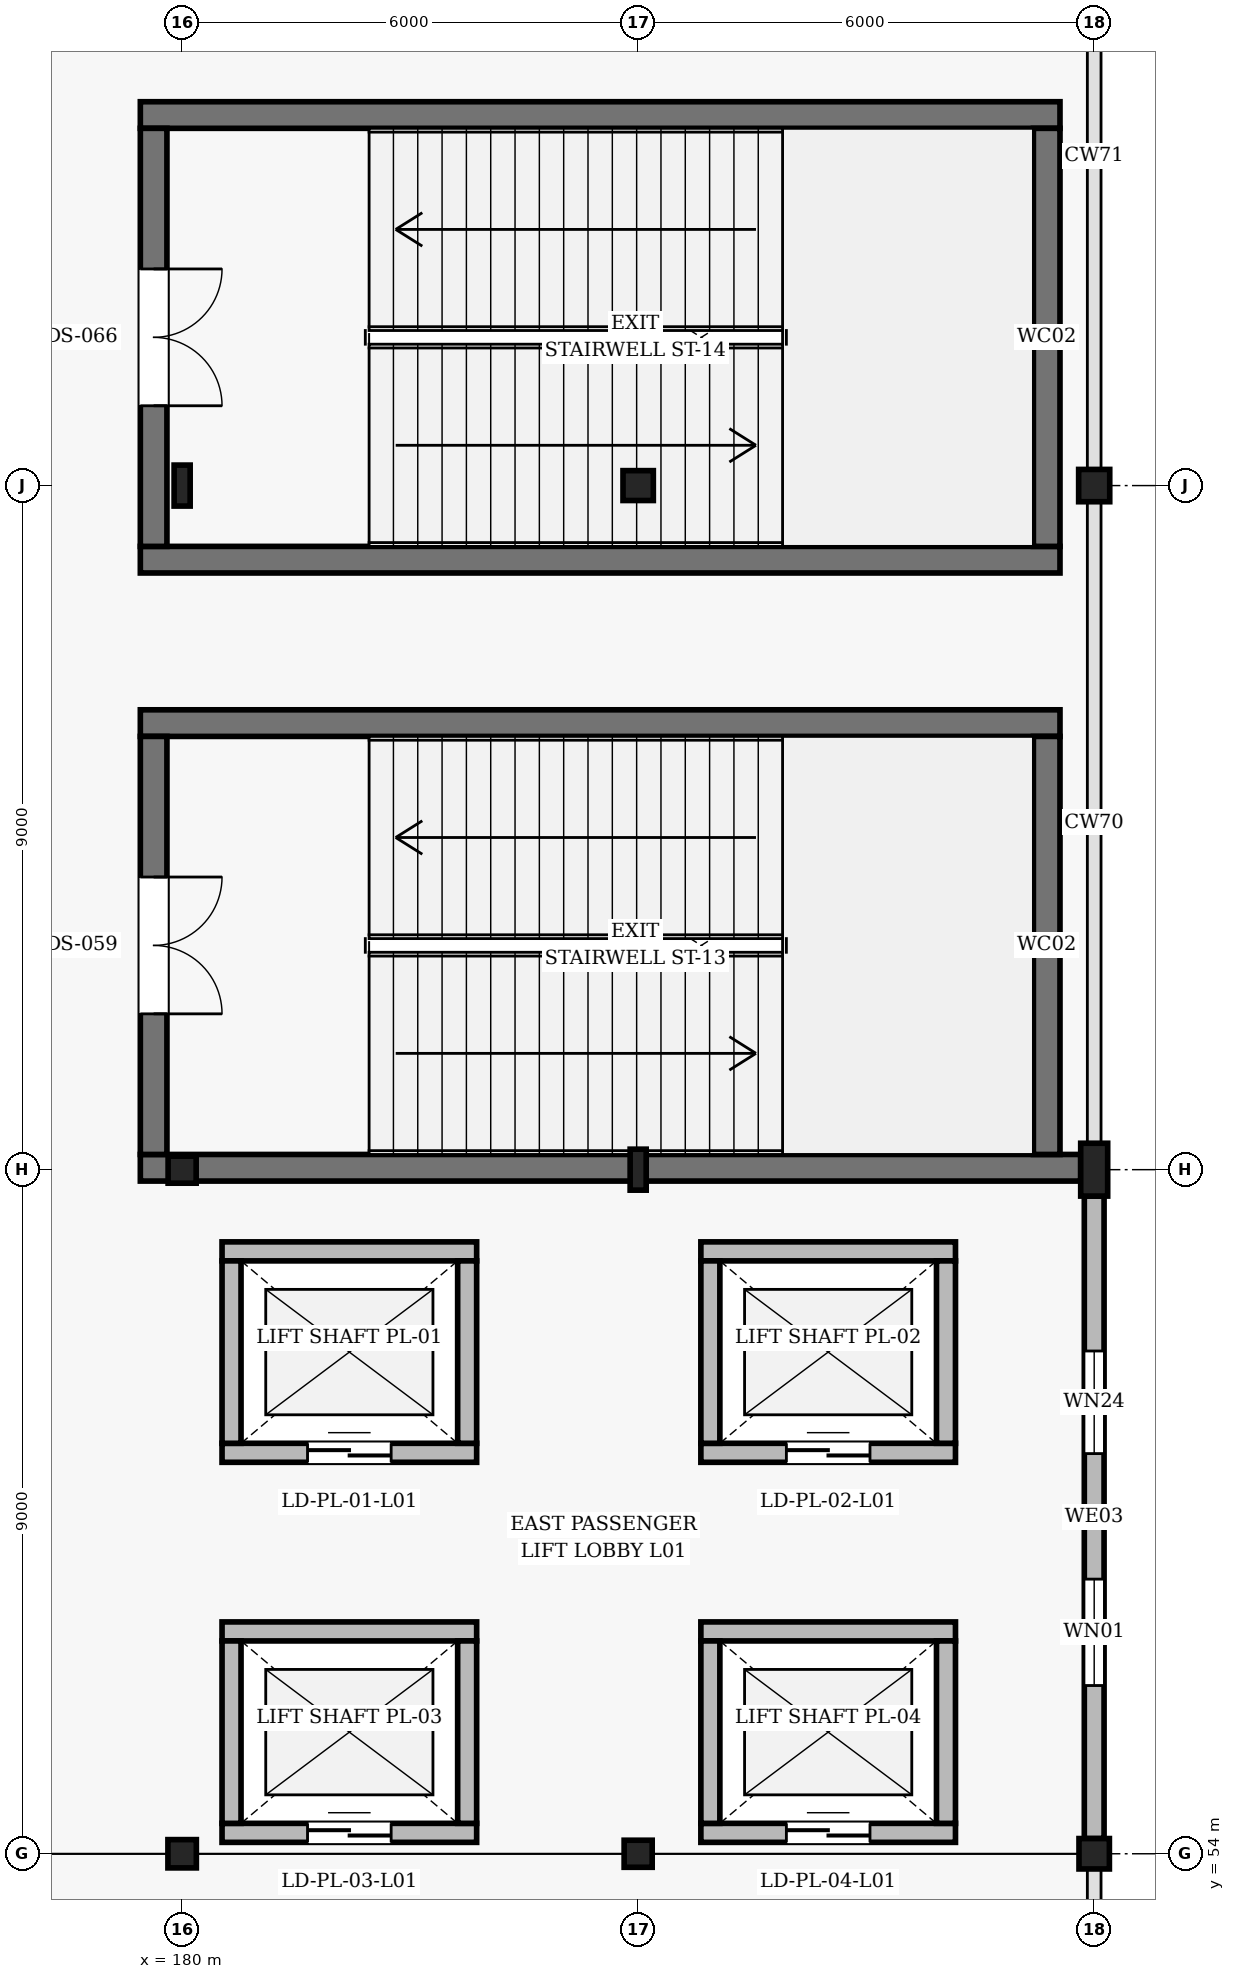
"""IFC4 building model, lengths in metres.
Left out: names, types, materials, properties, quantities, classifications, styles, units other than length and angle.
Written with IfcOpenShell. Run it as: python <this file> out.ifc"""

import sys

from ifc_helpers import new_model, si_unit, direction, frame, frame_2d, origin, origin_2d, place, context, subcontext, project, spatial, rectangle, hollow_rectangle, i_section, extrude, element, fill, save


model = new_model("IFC4")
c1 = context("Model", 3, precision=1e-05, world=origin(), true_north=direction((0.0, 1.0)))
c2 = subcontext(c1, "Body", "Model", "MODEL_VIEW")
j1 = project(units=[si_unit("LENGTHUNIT", "METRE"), si_unit("PLANEANGLEUNIT", "RADIAN")], contexts=[c1])
p1 = place(None, origin())
s1 = spatial("IfcSite", under=j1, at=p1, CompositionType="ELEMENT")
p2 = place(p1, origin())
s2 = spatial("IfcBuilding", under=s1, at=p2, CompositionType="ELEMENT")
p3 = place(p2, frame((0.0, 0.0, 5.4)))
s3 = spatial("IfcBuildingStorey", under=s2, at=p3, CompositionType="ELEMENT", Elevation=5.4)
p4 = place(p3, frame((180.0, 54.0, 0.0), z_axis=(0.0, 0.0, 1.0), x_axis=(1.0, 0.0, 0.0)))
e1 = element("IfcColumn", 1, at=p4, inside=s3, PredefinedType="COLUMN", context=c2, shape_type="SweptSolid", body=[
    extrude(i_section(OverallWidth=0.374, OverallDepth=0.372, WebThickness=0.016, FlangeThickness=0.026, FilletRadius=0.016, at=origin_2d()), origin(), (0.0, 0.0, 1.0), 5.4),
])
p5 = place(p3, frame((180.0, 63.0, 0.0), z_axis=(0.0, 0.0, 1.0), x_axis=(1.0, 0.0, 0.0)))
e2 = element("IfcColumn", 2, at=p5, inside=s3, PredefinedType="COLUMN", context=c2, shape_type="SweptSolid", body=[
    extrude(i_section(OverallWidth=0.369, OverallDepth=0.356, WebThickness=0.011, FlangeThickness=0.018, FilletRadius=0.015, at=origin_2d()), origin(), (0.0, 0.0, 1.0), 5.4),
])
p6 = place(p3, frame((180.0, 72.0, 0.0), z_axis=(0.0, 0.0, 1.0), x_axis=(1.0, 0.0, 0.0)))
e3 = element("IfcColumn", 3, at=p6, inside=s3, PredefinedType="COLUMN", context=c2, shape_type="SweptSolid", body=[
    extrude(i_section(OverallWidth=0.211, OverallDepth=0.539, WebThickness=0.012, FlangeThickness=0.019, FilletRadius=0.014, at=origin_2d()), origin(), (0.0, 0.0, 1.0), 5.4),
])
p7 = place(p3, frame((186.0, 54.0, 0.0), z_axis=(0.0, 0.0, 1.0), x_axis=(1.0, 0.0, 0.0)))
e4 = element("IfcColumn", 4, at=p7, inside=s3, PredefinedType="COLUMN", context=c2, shape_type="SweptSolid", body=[
    extrude(i_section(OverallWidth=0.369, OverallDepth=0.356, WebThickness=0.011, FlangeThickness=0.018, FilletRadius=0.015, at=origin_2d()), origin(), (0.0, 0.0, 1.0), 5.4),
])
p8 = place(p3, frame((186.0, 63.0, 0.0), z_axis=(0.0, 0.0, 1.0), x_axis=(1.0, 0.0, 0.0)))
e5 = element("IfcColumn", 5, at=p8, inside=s3, PredefinedType="COLUMN", context=c2, shape_type="SweptSolid", body=[
    extrude(i_section(OverallWidth=0.211, OverallDepth=0.539, WebThickness=0.012, FlangeThickness=0.019, FilletRadius=0.014, at=origin_2d()), origin(), (0.0, 0.0, 1.0), 5.4),
])
p9 = place(p3, frame((186.0, 72.0, 0.0), z_axis=(0.0, 0.0, 1.0), x_axis=(1.0, 0.0, 0.0)))
e6 = element("IfcColumn", 6, at=p9, inside=s3, PredefinedType="COLUMN", context=c2, shape_type="SweptSolid", body=[
    extrude(i_section(OverallWidth=0.399, OverallDepth=0.393, WebThickness=0.023, FlangeThickness=0.037, FilletRadius=0.018, at=origin_2d()), origin(), (0.0, 0.0, 1.0), 5.4),
])
p10 = place(p3, frame((192.0, 54.0, 0.0), z_axis=(0.0, 0.0, 1.0), x_axis=(1.0, 0.0, 0.0)))
e7 = element("IfcColumn", 7, at=p10, inside=s3, PredefinedType="COLUMN", context=c2, shape_type="SweptSolid", body=[
    extrude(hollow_rectangle(XDim=0.4, YDim=0.4, WallThickness=0.016, InnerFilletRadius=0.016, OuterFilletRadius=0.032, at=origin_2d()), origin(), (0.0, 0.0, 1.0), 5.4),
])
p11 = place(p3, frame((192.0, 63.0, 0.0), z_axis=(0.0, 0.0, 1.0), x_axis=(1.0, 0.0, 0.0)))
e8 = element("IfcColumn", 8, at=p11, inside=s3, PredefinedType="COLUMN", context=c2, shape_type="SweptSolid", body=[
    extrude(i_section(OverallWidth=0.355, OverallDepth=0.695, WebThickness=0.015, FlangeThickness=0.025, FilletRadius=0.018, at=origin_2d()), origin(), (0.0, 0.0, 1.0), 5.4),
])
p12 = place(p3, frame((192.0, 72.0, 0.0), z_axis=(0.0, 0.0, 1.0), x_axis=(1.0, 0.0, 0.0)))
e9 = element("IfcColumn", 9, at=p12, inside=s3, PredefinedType="COLUMN", context=c2, shape_type="SweptSolid", body=[
    extrude(i_section(OverallWidth=0.409, OverallDepth=0.425, WebThickness=0.031, FlangeThickness=0.049, FilletRadius=0.02, at=origin_2d()), origin(), (0.0, 0.0, 1.0), 5.4),
])
p13 = place(p3, frame((192.0, 62.653, 0.0), z_axis=(0.0, 0.0, 1.0), x_axis=(0.0, -1.0, 0.0)))
e10 = element("IfcWall", 10, at=p13, inside=s3, PredefinedType="SOLIDWALL", context=c2, shape_type="SweptSolid", body=[
    extrude(rectangle(XDim=8.453, YDim=0.26, at=frame_2d((4.226, 0.0))), origin(), (0.0, 0.0, 1.0), 4.865),
])
p14 = place(p13, frame((2.038, 0.0, 0.95)))
e11 = element("IfcOpeningElement", 11, at=p14, cuts=e10, PredefinedType="OPENING", context=c2, shape_type="SweptSolid", body=[
    extrude(rectangle(XDim=1.35, YDim=1.6, at=frame_2d((0.675, 0.8))), frame((0.0, 0.14, 0.0), z_axis=(0.0, -1.0, 0.0), x_axis=(1.0, 0.0, 0.0)), (0.0, 0.0, 1.0), 0.28),
])
p15 = place(p13, frame((5.039, 0.0, 0.95)))
e12 = element("IfcOpeningElement", 12, at=p15, cuts=e10, PredefinedType="OPENING", context=c2, shape_type="SweptSolid", body=[
    extrude(rectangle(XDim=1.4, YDim=1.7, at=frame_2d((0.7, 0.85))), frame((0.0, 0.14, 0.0), z_axis=(0.0, -1.0, 0.0), x_axis=(1.0, 0.0, 0.0)), (0.0, 0.0, 1.0), 0.28),
])
p16 = place(p3, frame((179.45, 63.025, 0.0), z_axis=(0.0, 0.0, 1.0), x_axis=(1.0, 0.0, 0.0)))
e13 = element("IfcWall", 13, at=p16, inside=s3, PredefinedType="SHEAR", context=c2, shape_type="SweptSolid", body=[
    extrude(rectangle(XDim=12.373, YDim=0.35, at=frame_2d((6.186, 0.0))), origin(), (0.0, 0.0, 1.0), 5.18),
])
p17 = place(p3, frame((191.55, 68.875, 0.0), z_axis=(0.0, 0.0, 1.0), x_axis=(-1.0, 0.0, 0.0)))
e14 = element("IfcWall", 14, at=p17, inside=s3, PredefinedType="SHEAR", context=c2, shape_type="SweptSolid", body=[
    extrude(rectangle(XDim=12.1, YDim=0.35, at=frame_2d((6.05, 0.0))), origin(), (0.0, 0.0, 1.0), 5.18),
])
p18 = place(p3, frame((179.625, 68.7, 0.0), z_axis=(0.0, 0.0, 1.0), x_axis=(0.0, -1.0, 0.0)))
e15 = element("IfcWall", 15, at=p18, inside=s3, PredefinedType="SHEAR", context=c2, shape_type="SweptSolid", body=[
    extrude(rectangle(XDim=5.5, YDim=0.35, at=frame_2d((2.75, 0.0))), origin(), (0.0, 0.0, 1.0), 5.18),
])
p19 = place(p18, frame((1.85, 0.0, 0.0)))
e16 = element("IfcOpeningElement", 16, at=p19, cuts=e15, PredefinedType="OPENING", context=c2, shape_type="SweptSolid", body=[
    extrude(rectangle(XDim=1.8, YDim=2.2, at=frame_2d((0.9, 1.1))), frame((0.0, 0.185, 0.0), z_axis=(0.0, -1.0, 0.0), x_axis=(1.0, 0.0, 0.0)), (0.0, 0.0, 1.0), 0.37),
])
p20 = place(p3, frame((191.375, 63.2, 0.0), z_axis=(0.0, 0.0, 1.0), x_axis=(0.0, 1.0, 0.0)))
e17 = element("IfcWall", 17, at=p20, inside=s3, PredefinedType="SHEAR", context=c2, shape_type="SweptSolid", body=[
    extrude(rectangle(XDim=5.5, YDim=0.35, at=frame_2d((2.75, 0.0))), origin(), (0.0, 0.0, 1.0), 5.18),
])
for number, where, z_axis, x_axis in (
    (18, (179.45, 71.025, 0.0), (0.0, 0.0, 1.0), (1.0, 0.0, 0.0)),
    (19, (191.55, 76.875, 0.0), (0.0, 0.0, 1.0), (-1.0, 0.0, 0.0)),
):
    element("IfcWall", number, at=place(p3, frame(where, z_axis=z_axis, x_axis=x_axis)), inside=s3, PredefinedType="SHEAR", context=c2, shape_type="SweptSolid", body=[
        extrude(rectangle(XDim=12.1, YDim=0.35, at=frame_2d((6.05, 0.0))), origin(), (0.0, 0.0, 1.0), 5.18),
    ])
p21 = place(p3, frame((179.625, 76.7, 0.0), z_axis=(0.0, 0.0, 1.0), x_axis=(0.0, -1.0, 0.0)))
e20 = element("IfcWall", 20, at=p21, inside=s3, PredefinedType="SHEAR", context=c2, shape_type="SweptSolid", body=[
    extrude(rectangle(XDim=5.5, YDim=0.35, at=frame_2d((2.75, 0.0))), origin(), (0.0, 0.0, 1.0), 5.18),
])
p22 = place(p21, frame((1.85, 0.0, 0.0)))
e21 = element("IfcOpeningElement", 21, at=p22, cuts=e20, PredefinedType="OPENING", context=c2, shape_type="SweptSolid", body=[
    extrude(rectangle(XDim=1.8, YDim=2.2, at=frame_2d((0.9, 1.1))), frame((0.0, 0.185, 0.0), z_axis=(0.0, -1.0, 0.0), x_axis=(1.0, 0.0, 0.0)), (0.0, 0.0, 1.0), 0.37),
])
p23 = place(p3, frame((191.375, 71.2, 0.0), z_axis=(0.0, 0.0, 1.0), x_axis=(0.0, 1.0, 0.0)))
e22 = element("IfcWall", 22, at=p23, inside=s3, PredefinedType="SHEAR", context=c2, shape_type="SweptSolid", body=[
    extrude(rectangle(XDim=5.5, YDim=0.35, at=frame_2d((2.75, 0.0))), origin(), (0.0, 0.0, 1.0), 5.18),
])
p24 = place(p3, frame((180.525, 59.275, 0.0), z_axis=(0.0, 0.0, 1.0), x_axis=(1.0, 0.0, 0.0)))
e23 = element("IfcWall", 23, at=p24, inside=s3, PredefinedType="SOLIDWALL", context=c2, shape_type="SweptSolid", body=[
    extrude(rectangle(XDim=3.35, YDim=0.25, at=frame_2d((1.675, 0.0))), origin(), (0.0, 0.0, 1.0), 5.16),
])
p25 = place(p24, frame((1.125, 0.0, 0.0)))
e24 = element("IfcOpeningElement", 24, at=p25, cuts=e23, PredefinedType="OPENING", context=c2, shape_type="SweptSolid", body=[
    extrude(rectangle(XDim=1.1, YDim=2.2, at=frame_2d((0.55, 1.1))), frame((0.0, 0.135, 0.0), z_axis=(0.0, -1.0, 0.0), x_axis=(1.0, 0.0, 0.0)), (0.0, 0.0, 1.0), 0.27),
])
p26 = place(p3, frame((183.875, 61.925, 0.0), z_axis=(0.0, 0.0, 1.0), x_axis=(-1.0, 0.0, 0.0)))
e25 = element("IfcWall", 25, at=p26, inside=s3, PredefinedType="SOLIDWALL", context=c2, shape_type="SweptSolid", body=[
    extrude(rectangle(XDim=3.35, YDim=0.25, at=frame_2d((1.675, 0.0))), origin(), (0.0, 0.0, 1.0), 5.16),
])
for number, where, z_axis, x_axis in (
    (26, (180.65, 61.8, 0.0), (0.0, 0.0, 1.0), (0.0, -1.0, 0.0)),
    (27, (183.75, 59.4, 0.0), (0.0, 0.0, 1.0), (0.0, 1.0, 0.0)),
):
    element("IfcWall", number, at=place(p3, frame(where, z_axis=z_axis, x_axis=x_axis)), inside=s3, PredefinedType="SOLIDWALL", context=c2, shape_type="SweptSolid", body=[
        extrude(rectangle(XDim=2.4, YDim=0.25, at=frame_2d((1.2, 0.0))), origin(), (0.0, 0.0, 1.0), 5.16),
    ])
p27 = place(p3, frame((186.825, 59.275, 0.0), z_axis=(0.0, 0.0, 1.0), x_axis=(1.0, 0.0, 0.0)))
e28 = element("IfcWall", 28, at=p27, inside=s3, PredefinedType="SOLIDWALL", context=c2, shape_type="SweptSolid", body=[
    extrude(rectangle(XDim=3.35, YDim=0.25, at=frame_2d((1.675, 0.0))), origin(), (0.0, 0.0, 1.0), 5.16),
])
p28 = place(p27, frame((1.125, 0.0, 0.0)))
e29 = element("IfcOpeningElement", 29, at=p28, cuts=e28, PredefinedType="OPENING", context=c2, shape_type="SweptSolid", body=[
    extrude(rectangle(XDim=1.1, YDim=2.2, at=frame_2d((0.55, 1.1))), frame((0.0, 0.135, 0.0), z_axis=(0.0, -1.0, 0.0), x_axis=(1.0, 0.0, 0.0)), (0.0, 0.0, 1.0), 0.27),
])
p29 = place(p3, frame((190.175, 61.925, 0.0), z_axis=(0.0, 0.0, 1.0), x_axis=(-1.0, 0.0, 0.0)))
e30 = element("IfcWall", 30, at=p29, inside=s3, PredefinedType="SOLIDWALL", context=c2, shape_type="SweptSolid", body=[
    extrude(rectangle(XDim=3.35, YDim=0.25, at=frame_2d((1.675, 0.0))), origin(), (0.0, 0.0, 1.0), 5.16),
])
for number, where, z_axis, x_axis in (
    (31, (186.95, 61.8, 0.0), (0.0, 0.0, 1.0), (0.0, -1.0, 0.0)),
    (32, (190.05, 59.4, 0.0), (0.0, 0.0, 1.0), (0.0, 1.0, 0.0)),
):
    element("IfcWall", number, at=place(p3, frame(where, z_axis=z_axis, x_axis=x_axis)), inside=s3, PredefinedType="SOLIDWALL", context=c2, shape_type="SweptSolid", body=[
        extrude(rectangle(XDim=2.4, YDim=0.25, at=frame_2d((1.2, 0.0))), origin(), (0.0, 0.0, 1.0), 5.16),
    ])
p30 = place(p3, frame((180.525, 54.275, 0.0), z_axis=(0.0, 0.0, 1.0), x_axis=(1.0, 0.0, 0.0)))
e33 = element("IfcWall", 33, at=p30, inside=s3, PredefinedType="SOLIDWALL", context=c2, shape_type="SweptSolid", body=[
    extrude(rectangle(XDim=3.35, YDim=0.25, at=frame_2d((1.675, 0.0))), origin(), (0.0, 0.0, 1.0), 4.43),
])
p31 = place(p30, frame((1.125, 0.0, 0.0)))
e34 = element("IfcOpeningElement", 34, at=p31, cuts=e33, PredefinedType="OPENING", context=c2, shape_type="SweptSolid", body=[
    extrude(rectangle(XDim=1.1, YDim=2.2, at=frame_2d((0.55, 1.1))), frame((0.0, 0.135, 0.0), z_axis=(0.0, -1.0, 0.0), x_axis=(1.0, 0.0, 0.0)), (0.0, 0.0, 1.0), 0.27),
])
p32 = place(p3, frame((183.875, 56.925, 0.0), z_axis=(0.0, 0.0, 1.0), x_axis=(-1.0, 0.0, 0.0)))
e35 = element("IfcWall", 35, at=p32, inside=s3, PredefinedType="SOLIDWALL", context=c2, shape_type="SweptSolid", body=[
    extrude(rectangle(XDim=3.35, YDim=0.25, at=frame_2d((1.675, 0.0))), origin(), (0.0, 0.0, 1.0), 4.557),
])
for number, where, z_axis, x_axis in (
    (36, (180.65, 56.8, 0.0), (0.0, 0.0, 1.0), (0.0, -1.0, 0.0)),
    (37, (183.75, 54.4, 0.0), (0.0, 0.0, 1.0), (0.0, 1.0, 0.0)),
):
    element("IfcWall", number, at=place(p3, frame(where, z_axis=z_axis, x_axis=x_axis)), inside=s3, PredefinedType="SOLIDWALL", context=c2, shape_type="SweptSolid", body=[
        extrude(rectangle(XDim=2.4, YDim=0.25, at=frame_2d((1.2, 0.0))), origin(), (0.0, 0.0, 1.0), 4.43),
    ])
p33 = place(p3, frame((186.825, 54.275, 0.0), z_axis=(0.0, 0.0, 1.0), x_axis=(1.0, 0.0, 0.0)))
e38 = element("IfcWall", 38, at=p33, inside=s3, PredefinedType="SOLIDWALL", context=c2, shape_type="SweptSolid", body=[
    extrude(rectangle(XDim=3.35, YDim=0.25, at=frame_2d((1.675, 0.0))), origin(), (0.0, 0.0, 1.0), 4.441),
])
p34 = place(p33, frame((1.125, 0.0, 0.0)))
e39 = element("IfcOpeningElement", 39, at=p34, cuts=e38, PredefinedType="OPENING", context=c2, shape_type="SweptSolid", body=[
    extrude(rectangle(XDim=1.1, YDim=2.2, at=frame_2d((0.55, 1.1))), frame((0.0, 0.135, 0.0), z_axis=(0.0, -1.0, 0.0), x_axis=(1.0, 0.0, 0.0)), (0.0, 0.0, 1.0), 0.27),
])
p35 = place(p3, frame((190.175, 56.925, 0.0), z_axis=(0.0, 0.0, 1.0), x_axis=(-1.0, 0.0, 0.0)))
e40 = element("IfcWall", 40, at=p35, inside=s3, PredefinedType="SOLIDWALL", context=c2, shape_type="SweptSolid", body=[
    extrude(rectangle(XDim=3.35, YDim=0.25, at=frame_2d((1.675, 0.0))), origin(), (0.0, 0.0, 1.0), 4.708),
])
for number, where, z_axis, x_axis in (
    (41, (186.95, 56.8, 0.0), (0.0, 0.0, 1.0), (0.0, -1.0, 0.0)),
    (42, (190.05, 54.4, 0.0), (0.0, 0.0, 1.0), (0.0, 1.0, 0.0)),
):
    element("IfcWall", number, at=place(p3, frame(where, z_axis=z_axis, x_axis=x_axis)), inside=s3, PredefinedType="SOLIDWALL", context=c2, shape_type="SweptSolid", body=[
        extrude(rectangle(XDim=2.4, YDim=0.25, at=frame_2d((1.2, 0.0))), origin(), (0.0, 0.0, 1.0), 4.441),
    ])
p36 = place(p14, origin())
e43 = element("IfcWindow", 43, at=p36, inside=s3, PartitioningType="SINGLE_PANEL", PredefinedType="WINDOW", context=c2, shape_type="SweptSolid", body=[
    extrude(rectangle(XDim=1.35, YDim=1.6, at=frame_2d((0.675, 0.8))), frame((0.0, 0.03, 0.0), z_axis=(0.0, -1.0, 0.0), x_axis=(1.0, 0.0, 0.0)), (0.0, 0.0, 1.0), 0.06),
])
fill(e11, e43)
p37 = place(p15, origin())
e44 = element("IfcWindow", 44, at=p37, inside=s3, PartitioningType="SINGLE_PANEL", PredefinedType="WINDOW", context=c2, shape_type="SweptSolid", body=[
    extrude(rectangle(XDim=1.4, YDim=1.7, at=frame_2d((0.7, 0.85))), frame((0.0, 0.03, 0.0), z_axis=(0.0, -1.0, 0.0), x_axis=(1.0, 0.0, 0.0)), (0.0, 0.0, 1.0), 0.06),
])
fill(e12, e44)
p38 = place(p19, origin())
e45 = element("IfcDoor", 45, at=p38, inside=s3, OperationType="DOUBLE_DOOR_SINGLE_SWING", PredefinedType="DOOR", context=c2, shape_type="SweptSolid", body=[
    extrude(rectangle(XDim=1.8, YDim=2.2, at=frame_2d((0.9, 1.1))), frame((0.0, 0.025, 0.0), z_axis=(0.0, -1.0, 0.0), x_axis=(1.0, 0.0, 0.0)), (0.0, 0.0, 1.0), 0.05),
])
fill(e16, e45)
p39 = place(p22, origin())
e46 = element("IfcDoor", 46, at=p39, inside=s3, OperationType="DOUBLE_DOOR_SINGLE_SWING", PredefinedType="DOOR", context=c2, shape_type="SweptSolid", body=[
    extrude(rectangle(XDim=1.8, YDim=2.2, at=frame_2d((0.9, 1.1))), frame((0.0, 0.025, 0.0), z_axis=(0.0, -1.0, 0.0), x_axis=(1.0, 0.0, 0.0)), (0.0, 0.0, 1.0), 0.05),
])
fill(e21, e46)
p40 = place(p25, origin())
e47 = element("IfcDoor", 47, at=p40, inside=s3, OperationType="DOUBLE_DOOR_SLIDING", PredefinedType="DOOR", context=c2, shape_type="SweptSolid", body=[
    extrude(rectangle(XDim=1.1, YDim=2.2, at=frame_2d((0.55, 1.1))), frame((0.0, 0.025, 0.0), z_axis=(0.0, -1.0, 0.0), x_axis=(1.0, 0.0, 0.0)), (0.0, 0.0, 1.0), 0.05),
])
fill(e24, e47)
p41 = place(p28, origin())
e48 = element("IfcDoor", 48, at=p41, inside=s3, OperationType="DOUBLE_DOOR_SLIDING", PredefinedType="DOOR", context=c2, shape_type="SweptSolid", body=[
    extrude(rectangle(XDim=1.1, YDim=2.2, at=frame_2d((0.55, 1.1))), frame((0.0, 0.025, 0.0), z_axis=(0.0, -1.0, 0.0), x_axis=(1.0, 0.0, 0.0)), (0.0, 0.0, 1.0), 0.05),
])
fill(e29, e48)
p42 = place(p31, origin())
e49 = element("IfcDoor", 49, at=p42, inside=s3, OperationType="DOUBLE_DOOR_SLIDING", PredefinedType="DOOR", context=c2, shape_type="SweptSolid", body=[
    extrude(rectangle(XDim=1.1, YDim=2.2, at=frame_2d((0.55, 1.1))), frame((0.0, 0.025, 0.0), z_axis=(0.0, -1.0, 0.0), x_axis=(1.0, 0.0, 0.0)), (0.0, 0.0, 1.0), 0.05),
])
fill(e34, e49)
p43 = place(p34, origin())
e50 = element("IfcDoor", 50, at=p43, inside=s3, OperationType="DOUBLE_DOOR_SLIDING", PredefinedType="DOOR", context=c2, shape_type="SweptSolid", body=[
    extrude(rectangle(XDim=1.1, YDim=2.2, at=frame_2d((0.55, 1.1))), frame((0.0, 0.025, 0.0), z_axis=(0.0, -1.0, 0.0), x_axis=(1.0, 0.0, 0.0)), (0.0, 0.0, 1.0), 0.05),
])
fill(e39, e50)
save(model, sys.argv[1])
